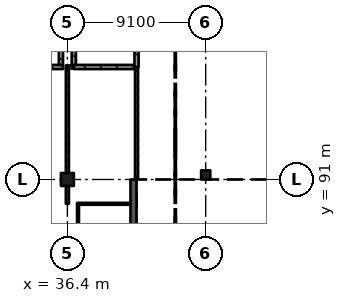
"""IFC4 building model, lengths in metres.
Left out: names, types, materials, properties, quantities, classifications, styles, units other than length and angle.
Written with IfcOpenShell. Run it as: python <this file> out.ifc"""

import sys

from ifc_helpers import new_model, si_unit, direction, frame, frame_2d, origin, origin_2d, place, context, subcontext, project, spatial, rectangle, extrude, element, fill, save


model = new_model("IFC4")
c1 = context("Model", 3, precision=1e-05, world=origin(), true_north=direction((0.0, 1.0)))
c2 = subcontext(c1, "Body", "Model", "MODEL_VIEW")
j1 = project(units=[si_unit("LENGTHUNIT", "METRE"), si_unit("PLANEANGLEUNIT", "RADIAN")], contexts=[c1])
p1 = place(None, origin())
s1 = spatial("IfcSite", under=j1, at=p1, CompositionType="ELEMENT")
p2 = place(p1, origin())
s2 = spatial("IfcBuilding", under=s1, at=p2, CompositionType="ELEMENT")
p3 = place(p2, frame((0.0, 0.0, 6.37)))
s3 = spatial("IfcBuildingStorey", under=s2, at=p3, CompositionType="ELEMENT", Elevation=6.37)
p4 = place(p3, frame((36.4, 91.0, 0.0), z_axis=(0.0, 0.0, 1.0), x_axis=(1.0, 0.0, 0.0)))
e1 = element("IfcColumn", 1, at=p4, inside=s3, PredefinedType="COLUMN", context=c2, shape_type="SweptSolid", body=[
    extrude(rectangle(XDim=0.85, YDim=0.85, at=origin_2d()), origin(), (0.0, 0.0, 1.0), 4.55),
])
p5 = place(p3, frame((45.5, 91.3, 0.0), z_axis=(0.0, 0.0, 1.0), x_axis=(1.0, 0.0, 0.0)))
e2 = element("IfcColumn", 2, at=p5, inside=s3, PredefinedType="COLUMN", context=c2, shape_type="SweptSolid", body=[
    extrude(rectangle(XDim=0.6, YDim=0.6, at=origin_2d()), origin(), (0.0, 0.0, 1.0), 4.55),
])
p6 = place(p3, frame((40.75, 68.25, 0.0), z_axis=(0.0, 0.0, 1.0), x_axis=(0.0, 1.0, 0.0)))
e3 = element("IfcWall", 3, at=p6, inside=s3, PredefinedType="SHEAR", context=c2, shape_type="SweptSolid", body=[
    extrude(rectangle(XDim=22.75, YDim=0.4, at=frame_2d((11.375, 0.0))), origin(), (0.0, 0.0, 1.0), 4.55),
])
p7 = place(p3, frame((33.43, 98.4, 0.0), z_axis=(0.0, 0.0, 1.0), x_axis=(1.0, 0.0, 0.0)))
e4 = element("IfcWall", 4, at=p7, inside=s3, PredefinedType="SOLIDWALL", context=c2, shape_type="SweptSolid", body=[
    extrude(rectangle(XDim=2.683, YDim=0.275, at=frame_2d((1.341, 0.0))), origin(), (0.0, 0.0, 1.0), 4.25),
])
p8 = place(p3, frame((35.975, 98.538, 0.0), z_axis=(0.0, 0.0, 1.0), x_axis=(0.0, 1.0, 0.0)))
e5 = element("IfcWall", 5, at=p8, inside=s3, PredefinedType="SOLIDWALL", context=c2, shape_type="SweptSolid", body=[
    extrude(rectangle(XDim=1.137, YDim=0.275, at=frame_2d((0.569, 0.0))), origin(), (0.0, 0.0, 1.0), 4.25),
])
p9 = place(p3, frame((36.4, 90.575, 0.0), z_axis=(0.0, 0.0, 1.0), x_axis=(0.0, -1.0, 0.0)))
e6 = element("IfcWall", 6, at=p9, inside=s3, PredefinedType="PARTITIONING", context=c2, shape_type="SweptSolid", body=[
    extrude(rectangle(XDim=1.175, YDim=0.2, at=frame_2d((0.587, 0.0))), origin(), (0.0, 0.0, 1.0), 3.55),
])
p10 = place(p3, frame((36.4, 98.3, 0.0), z_axis=(0.0, 0.0, 1.0), x_axis=(0.0, -1.0, 0.0)))
e7 = element("IfcWall", 7, at=p10, inside=s3, PredefinedType="PARTITIONING", context=c2, shape_type="SweptSolid", body=[
    extrude(rectangle(XDim=6.875, YDim=0.2, at=frame_2d((3.438, 0.0))), origin(), (0.0, 0.0, 1.0), 3.55),
])
p11 = place(p10, frame((0.85, 0.0, 0.0)))
e8 = element("IfcOpeningElement", 8, at=p11, cuts=e7, PredefinedType="OPENING", context=c2, shape_type="SweptSolid", body=[
    extrude(rectangle(XDim=1.8, YDim=2.4, at=frame_2d((0.9, 1.2))), frame((0.0, 0.11, 0.0), z_axis=(0.0, -1.0, 0.0), x_axis=(1.0, 0.0, 0.0)), (0.0, 0.0, 1.0), 0.22),
])
p12 = place(p10, frame((4.25, 0.0, 0.0)))
e9 = element("IfcOpeningElement", 9, at=p12, cuts=e7, PredefinedType="OPENING", context=c2, shape_type="SweptSolid", body=[
    extrude(rectangle(XDim=1.8, YDim=2.4, at=frame_2d((0.9, 1.2))), frame((0.0, 0.11, 0.0), z_axis=(0.0, -1.0, 0.0), x_axis=(1.0, 0.0, 0.0)), (0.0, 0.0, 1.0), 0.22),
])
p13 = place(p3, frame((36.825, 98.4, 0.0), z_axis=(0.0, 0.0, 1.0), x_axis=(-1.0, 0.0, 0.0)))
e10 = element("IfcWall", 10, at=p13, inside=s3, PredefinedType="PARTITIONING", context=c2, shape_type="SweptSolid", body=[
    extrude(rectangle(XDim=0.525, YDim=0.2, at=frame_2d((0.262, 0.0))), origin(), (0.0, 0.0, 1.0), 4.25),
])
p14 = place(p3, frame((36.825, 98.4, 0.0), z_axis=(0.0, 0.0, 1.0), x_axis=(1.0, 0.0, 0.0)))
e11 = element("IfcWall", 11, at=p14, inside=s3, PredefinedType="SOLIDWALL", context=c2, shape_type="SweptSolid", body=[
    extrude(rectangle(XDim=3.988, YDim=0.275, at=frame_2d((1.994, 0.0))), origin(), (0.0, 0.0, 1.0), 4.25),
])
p15 = place(p14, frame((1.35, 0.0, 0.0)))
e12 = element("IfcOpeningElement", 12, at=p15, cuts=e11, PredefinedType="OPENING", context=c2, shape_type="SweptSolid", body=[
    extrude(rectangle(XDim=1.2, YDim=2.4, at=frame_2d((0.6, 1.2))), frame((0.0, 0.147, 0.0), z_axis=(0.0, -1.0, 0.0), x_axis=(1.0, 0.0, 0.0)), (0.0, 0.0, 1.0), 0.295),
])
p16 = place(p3, frame((36.825, 99.675, 0.0), z_axis=(0.0, 0.0, 1.0), x_axis=(0.0, -1.0, 0.0)))
e13 = element("IfcWall", 13, at=p16, inside=s3, PredefinedType="SOLIDWALL", context=c2, shape_type="SweptSolid", body=[
    extrude(rectangle(XDim=1.137, YDim=0.275, at=frame_2d((0.569, 0.0))), origin(), (0.0, 0.0, 1.0), 4.25),
])
p17 = place(p3, frame((37.1, 89.337, 0.0), z_axis=(0.0, 0.0, 1.0), x_axis=(0.0, -1.0, 0.0)))
e14 = element("IfcWall", 14, at=p17, inside=s3, PredefinedType="PARTITIONING", context=c2, shape_type="SweptSolid", body=[
    extrude(rectangle(XDim=6.975, YDim=0.125, at=frame_2d((3.487, 0.0))), origin(), (0.0, 0.0, 1.0), 4.25),
])
p18 = place(p3, frame((40.55, 89.4, 0.0), z_axis=(0.0, 0.0, 1.0), x_axis=(-1.0, 0.0, 0.0)))
e15 = element("IfcWall", 15, at=p18, inside=s3, PredefinedType="PARTITIONING", context=c2, shape_type="SweptSolid", body=[
    extrude(rectangle(XDim=3.512, YDim=0.125, at=frame_2d((1.756, 0.0))), origin(), (0.0, 0.0, 1.0), 4.25),
])
p19 = place(p18, frame((1.35, 0.0, 0.0)))
e16 = element("IfcOpeningElement", 16, at=p19, cuts=e15, PredefinedType="OPENING", context=c2, shape_type="SweptSolid", body=[
    extrude(rectangle(XDim=0.9, YDim=2.1, at=frame_2d((0.45, 1.05))), frame((0.0, 0.073, 0.0), z_axis=(0.0, -1.0, 0.0), x_axis=(1.0, 0.0, 0.0)), (0.0, 0.0, 1.0), 0.145),
])
p20 = place(p3, frame((40.95, 98.4, 0.0), z_axis=(0.0, 0.0, 1.0), x_axis=(0.0, -1.0, 0.0)))
e17 = element("IfcWall", 17, at=p20, inside=s3, PredefinedType="PARTITIONING", context=c2, shape_type="SweptSolid", body=[
    extrude(rectangle(XDim=7.37, YDim=0.2, at=frame_2d((3.685, 0.0))), origin(), (0.0, 0.0, 1.0), 4.25),
])
p21 = place(p20, frame((0.95, 0.0, 0.0)))
e18 = element("IfcOpeningElement", 18, at=p21, cuts=e17, PredefinedType="OPENING", context=c2, shape_type="SweptSolid", body=[
    extrude(rectangle(XDim=1.8, YDim=2.4, at=frame_2d((0.9, 1.2))), frame((0.0, 0.11, 0.0), z_axis=(0.0, -1.0, 0.0), x_axis=(1.0, 0.0, 0.0)), (0.0, 0.0, 1.0), 0.22),
])
p22 = place(p20, frame((4.65, 0.0, 0.0)))
e19 = element("IfcOpeningElement", 19, at=p22, cuts=e17, PredefinedType="OPENING", context=c2, shape_type="SweptSolid", body=[
    extrude(rectangle(XDim=1.8, YDim=2.4, at=frame_2d((0.9, 1.2))), frame((0.0, 0.11, 0.0), z_axis=(0.0, -1.0, 0.0), x_axis=(1.0, 0.0, 0.0)), (0.0, 0.0, 1.0), 0.22),
])
p23 = place(p3, frame((40.95, 98.4, 0.0), z_axis=(0.0, 0.0, 1.0), x_axis=(0.0, 1.0, 0.0)))
e20 = element("IfcWall", 20, at=p23, inside=s3, PredefinedType="SOLIDWALL", context=c2, shape_type="SweptSolid", body=[
    extrude(rectangle(XDim=10.77, YDim=0.275, at=frame_2d((5.385, 0.0))), origin(), (0.0, 0.0, 1.0), 4.25),
])
p24 = place(p19, origin())
e21 = element("IfcDoor", 21, at=p24, inside=s3, OperationType="SINGLE_SWING_LEFT", PredefinedType="DOOR", context=c2, shape_type="SweptSolid", body=[
    extrude(rectangle(XDim=0.9, YDim=2.1, at=frame_2d((0.45, 1.05))), frame((0.0, 0.025, 0.0), z_axis=(0.0, -1.0, 0.0), x_axis=(1.0, 0.0, 0.0)), (0.0, 0.0, 1.0), 0.05),
])
fill(e16, e21)
p25 = place(p15, origin())
e22 = element("IfcDoor", 22, at=p25, inside=s3, OperationType="SINGLE_SWING_RIGHT", PredefinedType="DOOR", context=c2, shape_type="SweptSolid", body=[
    extrude(rectangle(XDim=1.2, YDim=2.4, at=frame_2d((0.6, 1.2))), frame((0.0, 0.025, 0.0), z_axis=(0.0, -1.0, 0.0), x_axis=(1.0, 0.0, 0.0)), (0.0, 0.0, 1.0), 0.05),
])
fill(e12, e22)
p26 = place(p11, origin())
e23 = element("IfcDoor", 23, at=p26, inside=s3, OperationType="DOUBLE_DOOR_SINGLE_SWING", PredefinedType="DOOR", context=c2, shape_type="SweptSolid", body=[
    extrude(rectangle(XDim=1.8, YDim=2.4, at=frame_2d((0.9, 1.2))), frame((0.0, 0.025, 0.0), z_axis=(0.0, -1.0, 0.0), x_axis=(1.0, 0.0, 0.0)), (0.0, 0.0, 1.0), 0.05),
])
fill(e8, e23)
p27 = place(p12, origin())
e24 = element("IfcDoor", 24, at=p27, inside=s3, OperationType="DOUBLE_DOOR_SINGLE_SWING", PredefinedType="DOOR", context=c2, shape_type="SweptSolid", body=[
    extrude(rectangle(XDim=1.8, YDim=2.4, at=frame_2d((0.9, 1.2))), frame((0.0, 0.025, 0.0), z_axis=(0.0, -1.0, 0.0), x_axis=(1.0, 0.0, 0.0)), (0.0, 0.0, 1.0), 0.05),
])
fill(e9, e24)
p28 = place(p21, origin())
e25 = element("IfcDoor", 25, at=p28, inside=s3, OperationType="DOUBLE_DOOR_SINGLE_SWING", PredefinedType="DOOR", context=c2, shape_type="SweptSolid", body=[
    extrude(rectangle(XDim=1.8, YDim=2.4, at=frame_2d((0.9, 1.2))), frame((0.0, 0.025, 0.0), z_axis=(0.0, -1.0, 0.0), x_axis=(1.0, 0.0, 0.0)), (0.0, 0.0, 1.0), 0.05),
])
fill(e18, e25)
p29 = place(p22, origin())
e26 = element("IfcDoor", 26, at=p29, inside=s3, OperationType="DOUBLE_DOOR_SINGLE_SWING", PredefinedType="DOOR", context=c2, shape_type="SweptSolid", body=[
    extrude(rectangle(XDim=1.8, YDim=2.4, at=frame_2d((0.9, 1.2))), frame((0.0, 0.025, 0.0), z_axis=(0.0, -1.0, 0.0), x_axis=(1.0, 0.0, 0.0)), (0.0, 0.0, 1.0), 0.05),
])
fill(e19, e26)
save(model, sys.argv[1])
